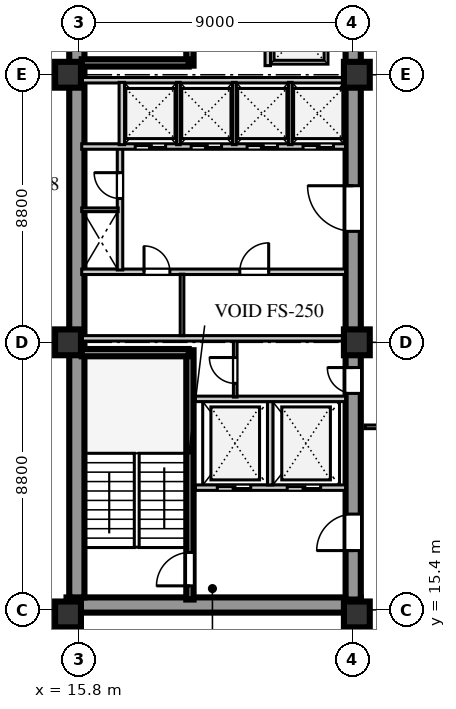
"""IFC4 building model, lengths in metres.
Left out: names, types, materials, properties, quantities, classifications, styles, units other than length and angle.
Written with IfcOpenShell. Run it as: python <this file> out.ifc"""

import sys

from ifc_helpers import new_model, si_unit, direction, frame, frame_2d, origin, origin_2d, place, context, subcontext, project, spatial, rectangle, extrude, element, fill, save


model = new_model("IFC4")
c1 = context("Model", 3, precision=1e-05, world=origin(), true_north=direction((0.0, 1.0)))
c2 = subcontext(c1, "Body", "Model", "MODEL_VIEW")
j1 = project(units=[si_unit("LENGTHUNIT", "METRE"), si_unit("PLANEANGLEUNIT", "RADIAN")], contexts=[c1])
p1 = place(None, origin())
s1 = spatial("IfcSite", under=j1, at=p1, CompositionType="ELEMENT")
p2 = place(p1, origin())
s2 = spatial("IfcBuilding", under=s1, at=p2, CompositionType="ELEMENT")
p3 = place(p2, frame((0.0, 0.0, 181.0)))
s3 = spatial("IfcBuildingStorey", under=s2, at=p3, CompositionType="ELEMENT", Elevation=181.0)
p4 = place(p3, frame((15.4, 15.56, 0.0), z_axis=(0.0, 0.0, 1.0), x_axis=(1.0, 0.0, 0.0)))
e1 = element("IfcWall", 1, at=p4, inside=s3, PredefinedType="SHEAR", context=c2, shape_type="SweptSolid", body=[
    extrude(rectangle(XDim=9.68, YDim=0.5, at=frame_2d((4.84, 0.0))), origin(), (0.0, 0.0, 1.0), 3.6),
])
p5 = place(p3, frame((15.74, 15.81, 0.0), z_axis=(0.0, 0.0, 1.0), x_axis=(0.0, 1.0, 0.0)))
e2 = element("IfcWall", 2, at=p5, inside=s3, PredefinedType="SHEAR", context=c2, shape_type="SweptSolid", body=[
    extrude(rectangle(XDim=25.63, YDim=0.5, at=frame_2d((12.815, 0.0))), origin(), (0.0, 0.0, 1.0), 3.6),
])
p6 = place(p3, frame((24.83, 15.74, 0.0), z_axis=(0.0, 0.0, 1.0), x_axis=(0.0, 1.0, 0.0)))
e3 = element("IfcWall", 3, at=p6, inside=s3, PredefinedType="SHEAR", context=c2, shape_type="SweptSolid", body=[
    extrude(rectangle(XDim=25.76, YDim=0.5, at=frame_2d((12.88, 0.0))), origin(), (0.0, 0.0, 1.0), 3.6),
])
p7 = place(p6, frame((1.61, 0.0, 0.0)))
e4 = element("IfcOpeningElement", 4, at=p7, cuts=e3, PredefinedType="OPENING", context=c2, shape_type="SweptSolid", body=[
    extrude(rectangle(XDim=1.2, YDim=2.1, at=frame_2d((0.6, 1.05))), frame((0.0, 0.26, 0.0), z_axis=(0.0, -1.0, 0.0), x_axis=(1.0, 0.0, 0.0)), (0.0, 0.0, 1.0), 0.52),
])
p8 = place(p6, frame((6.78, 0.0, 0.0)))
e5 = element("IfcOpeningElement", 5, at=p8, cuts=e3, PredefinedType="OPENING", context=c2, shape_type="SweptSolid", body=[
    extrude(rectangle(XDim=0.85, YDim=2.06, at=frame_2d((0.425, 1.03))), frame((0.0, 0.26, 0.0), z_axis=(0.0, -1.0, 0.0), x_axis=(1.0, 0.0, 0.0)), (0.0, 0.0, 1.0), 0.52),
])
p9 = place(p6, frame((12.11, 0.0, 0.0)))
e6 = element("IfcOpeningElement", 6, at=p9, cuts=e3, PredefinedType="OPENING", context=c2, shape_type="SweptSolid", body=[
    extrude(rectangle(XDim=1.5, YDim=2.12, at=frame_2d((0.75, 1.06))), frame((0.0, 0.26, 0.0), z_axis=(0.0, -1.0, 0.0), x_axis=(1.0, 0.0, 0.0)), (0.0, 0.0, 1.0), 0.52),
])
p10 = place(p6, frame((20.11, 0.0, 0.0)))
e7 = element("IfcOpeningElement", 7, at=p10, cuts=e3, PredefinedType="OPENING", context=c2, shape_type="SweptSolid", body=[
    extrude(rectangle(XDim=1.2, YDim=2.12, at=frame_2d((0.6, 1.06))), frame((0.0, 0.26, 0.0), z_axis=(0.0, -1.0, 0.0), x_axis=(1.0, 0.0, 0.0)), (0.0, 0.0, 1.0), 0.52),
])
p11 = place(p6, frame((24.01, 0.0, 0.0)))
e8 = element("IfcOpeningElement", 8, at=p11, cuts=e3, PredefinedType="OPENING", context=c2, shape_type="SweptSolid", body=[
    extrude(rectangle(XDim=0.95, YDim=2.1, at=frame_2d((0.475, 1.05))), frame((0.0, 0.26, 0.0), z_axis=(0.0, -1.0, 0.0), x_axis=(1.0, 0.0, 0.0)), (0.0, 0.0, 1.0), 0.52),
])
for number, where, z_axis, x_axis in (
    (9, (15.45, 15.25, 0.0), (0.0, 0.0, 1.0), (1.0, 0.0, 0.0)),
    (10, (15.45, 24.2, 0.0), (0.0, 0.0, 1.0), (1.0, 0.0, 0.0)),
    (11, (15.45, 33.0, 0.0), (0.0, 0.0, 1.0), (1.0, 0.0, 0.0)),
    (12, (24.95, 15.25, 0.0), (0.0, 0.0, 1.0), (1.0, 0.0, 0.0)),
    (13, (24.95, 24.2, 0.0), (0.0, 0.0, 1.0), (1.0, 0.0, 0.0)),
    (14, (24.95, 33.0, 0.0), (0.0, 0.0, 1.0), (1.0, 0.0, 0.0)),
):
    element("IfcColumn", number, at=place(p3, frame(where, z_axis=z_axis, x_axis=x_axis)), inside=s3, PredefinedType="COLUMN", context=c2, shape_type="SweptSolid", body=[
        extrude(rectangle(XDim=0.85, YDim=0.85, at=origin_2d()), origin(), (0.0, 0.0, 1.0), 3.6),
    ])
p12 = place(p3, frame((19.46, 15.74, 0.0), z_axis=(0.0, 0.0, 1.0), x_axis=(0.0, 1.0, 0.0)))
e15 = element("IfcWall", 15, at=p12, inside=s3, PredefinedType="SHEAR", context=c2, shape_type="SweptSolid", body=[
    extrude(rectangle(XDim=8.2, YDim=0.24, at=frame_2d((4.1, 0.0))), origin(), (0.0, 0.0, 1.0), 3.85),
])
p13 = place(p12, frame((0.45, 0.0, 0.0)))
e16 = element("IfcOpeningElement", 16, at=p13, cuts=e15, PredefinedType="OPENING", context=c2, shape_type="SweptSolid", body=[
    extrude(rectangle(XDim=1.1, YDim=2.1, at=frame_2d((0.55, 1.05))), frame((0.0, 0.13, 0.0), z_axis=(0.0, -1.0, 0.0), x_axis=(1.0, 0.0, 0.0)), (0.0, 0.0, 1.0), 0.26),
])
p14 = place(p3, frame((15.9, 23.86, 0.0), z_axis=(0.0, 0.0, 1.0), x_axis=(1.0, 0.0, 0.0)))
e17 = element("IfcWall", 17, at=p14, inside=s3, PredefinedType="SHEAR", context=c2, shape_type="SweptSolid", body=[
    extrude(rectangle(XDim=3.52, YDim=0.24, at=frame_2d((1.76, 0.0))), origin(), (0.0, 0.0, 1.0), 3.85),
])
p15 = place(p3, frame((19.64, 19.42, 0.0), z_axis=(0.0, 0.0, 1.0), x_axis=(1.0, 0.0, 0.0)))
e18 = element("IfcWall", 18, at=p15, inside=s3, PredefinedType="SOLIDWALL", context=c2, shape_type="SweptSolid", body=[
    extrude(rectangle(XDim=4.94, YDim=0.18, at=frame_2d((2.47, 0.0))), origin(), (0.0, 0.0, 1.0), 3.6),
])
p16 = place(p15, frame((0.72, 0.0, 0.0)))
e19 = element("IfcOpeningElement", 19, at=p16, cuts=e18, PredefinedType="OPENING", context=c2, shape_type="SweptSolid", body=[
    extrude(rectangle(XDim=1.1, YDim=2.1, at=frame_2d((0.55, 1.05))), frame((0.0, 0.1, 0.0), z_axis=(0.0, -1.0, 0.0), x_axis=(1.0, 0.0, 0.0)), (0.0, 0.0, 1.0), 0.2),
])
p17 = place(p15, frame((3.02, 0.0, 0.0)))
e20 = element("IfcOpeningElement", 20, at=p17, cuts=e18, PredefinedType="OPENING", context=c2, shape_type="SweptSolid", body=[
    extrude(rectangle(XDim=1.1, YDim=2.1, at=frame_2d((0.55, 1.05))), frame((0.0, 0.1, 0.0), z_axis=(0.0, -1.0, 0.0), x_axis=(1.0, 0.0, 0.0)), (0.0, 0.0, 1.0), 0.2),
])
p18 = place(p3, frame((22.1, 19.51, 0.0), z_axis=(0.0, 0.0, 1.0), x_axis=(0.0, 1.0, 0.0)))
e21 = element("IfcWall", 21, at=p18, inside=s3, PredefinedType="SOLIDWALL", context=c2, shape_type="SweptSolid", body=[
    extrude(rectangle(XDim=2.74, YDim=0.18, at=frame_2d((1.37, 0.0))), origin(), (0.0, 0.0, 1.0), 3.6),
])
p19 = place(p3, frame((19.64, 22.34, 0.0), z_axis=(0.0, 0.0, 1.0), x_axis=(1.0, 0.0, 0.0)))
e22 = element("IfcWall", 22, at=p19, inside=s3, PredefinedType="SOLIDWALL", context=c2, shape_type="SweptSolid", body=[
    extrude(rectangle(XDim=4.94, YDim=0.18, at=frame_2d((2.47, 0.0))), origin(), (0.0, 0.0, 1.0), 3.6),
])
p20 = place(p3, frame((20.95, 22.4, 0.0), z_axis=(0.0, 0.0, 1.0), x_axis=(0.0, 1.0, 0.0)))
e23 = element("IfcWall", 23, at=p20, inside=s3, PredefinedType="PARTITIONING", context=c2, shape_type="SweptSolid", body=[
    extrude(rectangle(XDim=1.88, YDim=0.12, at=frame_2d((0.94, 0.0))), origin(), (0.0, 0.0, 1.0), 3.6),
])
p21 = place(p20, frame((0.45, 0.0, 0.0)))
e24 = element("IfcOpeningElement", 24, at=p21, cuts=e23, PredefinedType="OPENING", context=c2, shape_type="SweptSolid", body=[
    extrude(rectangle(XDim=0.85, YDim=2.06, at=frame_2d((0.425, 1.03))), frame((0.0, 0.07, 0.0), z_axis=(0.0, -1.0, 0.0), x_axis=(1.0, 0.0, 0.0)), (0.0, 0.0, 1.0), 0.14),
])
p22 = place(p3, frame((15.9, 26.52, 0.0), z_axis=(0.0, 0.0, 1.0), x_axis=(1.0, 0.0, 0.0)))
e25 = element("IfcWall", 25, at=p22, inside=s3, PredefinedType="SOLIDWALL", context=c2, shape_type="SweptSolid", body=[
    extrude(rectangle(XDim=8.68, YDim=0.18, at=frame_2d((4.34, 0.0))), origin(), (0.0, 0.0, 1.0), 3.6),
])
p23 = place(p22, frame((2.05, 0.0, 0.0)))
e26 = element("IfcOpeningElement", 26, at=p23, cuts=e25, PredefinedType="OPENING", context=c2, shape_type="SweptSolid", body=[
    extrude(rectangle(XDim=0.85, YDim=2.06, at=frame_2d((0.425, 1.03))), frame((0.0, 0.1, 0.0), z_axis=(0.0, -1.0, 0.0), x_axis=(1.0, 0.0, 0.0)), (0.0, 0.0, 1.0), 0.2),
])
p24 = place(p22, frame((5.2, 0.0, 0.0)))
e27 = element("IfcOpeningElement", 27, at=p24, cuts=e25, PredefinedType="OPENING", context=c2, shape_type="SweptSolid", body=[
    extrude(rectangle(XDim=0.95, YDim=2.1, at=frame_2d((0.475, 1.05))), frame((0.0, 0.1, 0.0), z_axis=(0.0, -1.0, 0.0), x_axis=(1.0, 0.0, 0.0)), (0.0, 0.0, 1.0), 0.2),
])
p25 = place(p3, frame((15.9, 24.33, 0.0), z_axis=(0.0, 0.0, 1.0), x_axis=(1.0, 0.0, 0.0)))
e28 = element("IfcWall", 28, at=p25, inside=s3, PredefinedType="SOLIDWALL", context=c2, shape_type="SweptSolid", body=[
    extrude(rectangle(XDim=8.68, YDim=0.18, at=frame_2d((4.34, 0.0))), origin(), (0.0, 0.0, 1.0), 2.95),
])
p26 = place(p3, frame((19.2, 24.42, 0.0), z_axis=(0.0, 0.0, 1.0), x_axis=(0.0, 1.0, 0.0)))
e29 = element("IfcWall", 29, at=p26, inside=s3, PredefinedType="PARTITIONING", context=c2, shape_type="SweptSolid", body=[
    extrude(rectangle(XDim=2.02, YDim=0.12, at=frame_2d((1.01, 0.0))), origin(), (0.0, 0.0, 1.0), 3.6),
])
p27 = place(p3, frame((17.16, 26.58, 0.0), z_axis=(0.0, 0.0, 1.0), x_axis=(0.0, 1.0, 0.0)))
e30 = element("IfcWall", 30, at=p27, inside=s3, PredefinedType="SOLIDWALL", context=c2, shape_type="SweptSolid", body=[
    extrude(rectangle(XDim=4.02, YDim=0.18, at=frame_2d((2.01, 0.0))), origin(), (0.0, 0.0, 1.0), 3.6),
])
p28 = place(p27, frame((2.35, 0.0, 0.0)))
e31 = element("IfcOpeningElement", 31, at=p28, cuts=e30, PredefinedType="OPENING", context=c2, shape_type="SweptSolid", body=[
    extrude(rectangle(XDim=0.85, YDim=2.06, at=frame_2d((0.425, 1.03))), frame((0.0, 0.1, 0.0), z_axis=(0.0, -1.0, 0.0), x_axis=(1.0, 0.0, 0.0)), (0.0, 0.0, 1.0), 0.2),
])
p29 = place(p3, frame((15.9, 28.56, 0.0), z_axis=(0.0, 0.0, 1.0), x_axis=(1.0, 0.0, 0.0)))
e32 = element("IfcWall", 32, at=p29, inside=s3, PredefinedType="PARTITIONING", context=c2, shape_type="SweptSolid", body=[
    extrude(rectangle(XDim=1.2, YDim=0.12, at=frame_2d((0.6, 0.0))), origin(), (0.0, 0.0, 1.0), 3.6),
])
p30 = place(p3, frame((15.9, 30.64, 0.0), z_axis=(0.0, 0.0, 1.0), x_axis=(1.0, 0.0, 0.0)))
e33 = element("IfcWall", 33, at=p30, inside=s3, PredefinedType="SOLIDWALL", context=c2, shape_type="SweptSolid", body=[
    extrude(rectangle(XDim=8.68, YDim=0.18, at=frame_2d((4.34, 0.0))), origin(), (0.0, 0.0, 1.0), 3.6),
])
p31 = place(p30, frame((1.76, 0.0, 0.0)))
e34 = element("IfcOpeningElement", 34, at=p31, cuts=e33, PredefinedType="OPENING", context=c2, shape_type="SweptSolid", body=[
    extrude(rectangle(XDim=1.0, YDim=2.1, at=frame_2d((0.5, 1.05))), frame((0.0, 0.1, 0.0), z_axis=(0.0, -1.0, 0.0), x_axis=(1.0, 0.0, 0.0)), (0.0, 0.0, 1.0), 0.2),
])
p32 = place(p30, frame((3.6, 0.0, 0.0)))
e35 = element("IfcOpeningElement", 35, at=p32, cuts=e33, PredefinedType="OPENING", context=c2, shape_type="SweptSolid", body=[
    extrude(rectangle(XDim=1.0, YDim=2.1, at=frame_2d((0.5, 1.05))), frame((0.0, 0.1, 0.0), z_axis=(0.0, -1.0, 0.0), x_axis=(1.0, 0.0, 0.0)), (0.0, 0.0, 1.0), 0.2),
])
p33 = place(p30, frame((5.44, 0.0, 0.0)))
e36 = element("IfcOpeningElement", 36, at=p33, cuts=e33, PredefinedType="OPENING", context=c2, shape_type="SweptSolid", body=[
    extrude(rectangle(XDim=1.0, YDim=2.1, at=frame_2d((0.5, 1.05))), frame((0.0, 0.1, 0.0), z_axis=(0.0, -1.0, 0.0), x_axis=(1.0, 0.0, 0.0)), (0.0, 0.0, 1.0), 0.2),
])
p34 = place(p30, frame((7.28, 0.0, 0.0)))
e37 = element("IfcOpeningElement", 37, at=p34, cuts=e33, PredefinedType="OPENING", context=c2, shape_type="SweptSolid", body=[
    extrude(rectangle(XDim=1.0, YDim=2.1, at=frame_2d((0.5, 1.05))), frame((0.0, 0.1, 0.0), z_axis=(0.0, -1.0, 0.0), x_axis=(1.0, 0.0, 0.0)), (0.0, 0.0, 1.0), 0.2),
])
p35 = place(p3, frame((15.9, 32.82, 0.0), z_axis=(0.0, 0.0, 1.0), x_axis=(1.0, 0.0, 0.0)))
e38 = element("IfcWall", 38, at=p35, inside=s3, PredefinedType="SOLIDWALL", context=c2, shape_type="SweptSolid", body=[
    extrude(rectangle(XDim=8.68, YDim=0.18, at=frame_2d((4.34, 0.0))), origin(), (0.0, 0.0, 1.0), 2.95),
])
p36 = place(p3, frame((17.22, 30.7, 0.0), z_axis=(0.0, 0.0, 1.0), x_axis=(0.0, 1.0, 0.0)))
e39 = element("IfcWall", 39, at=p36, inside=s3, PredefinedType="SOLIDWALL", context=c2, shape_type="SweptSolid", body=[
    extrude(rectangle(XDim=2.05, YDim=0.18, at=frame_2d((1.025, 0.0))), origin(), (0.0, 0.0, 1.0), 3.6),
])
for number, where, z_axis, x_axis in (
    (40, (19.08, 30.7, 0.0), (0.0, 0.0, 1.0), (0.0, 1.0, 0.0)),
    (41, (20.92, 30.7, 0.0), (0.0, 0.0, 1.0), (0.0, 1.0, 0.0)),
    (42, (22.76, 30.7, 0.0), (0.0, 0.0, 1.0), (0.0, 1.0, 0.0)),
):
    element("IfcWall", number, at=place(p3, frame(where, z_axis=z_axis, x_axis=x_axis)), inside=s3, PredefinedType="PARTITIONING", context=c2, shape_type="SweptSolid", body=[
        extrude(rectangle(XDim=2.05, YDim=0.12, at=frame_2d((1.025, 0.0))), origin(), (0.0, 0.0, 1.0), 3.6),
    ])
p37 = place(p3, frame((19.46, 33.3, 0.0), z_axis=(0.0, 0.0, 1.0), x_axis=(0.0, 1.0, 0.0)))
e43 = element("IfcWall", 43, at=p37, inside=s3, PredefinedType="SHEAR", context=c2, shape_type="SweptSolid", body=[
    extrude(rectangle(XDim=8.18, YDim=0.24, at=frame_2d((4.09, 0.0))), origin(), (0.0, 0.0, 1.0), 3.85),
])
p38 = place(p37, frame((0.65, 0.0, 0.0)))
e44 = element("IfcOpeningElement", 44, at=p38, cuts=e43, PredefinedType="OPENING", context=c2, shape_type="SweptSolid", body=[
    extrude(rectangle(XDim=1.1, YDim=2.1, at=frame_2d((0.55, 1.05))), frame((0.0, 0.13, 0.0), z_axis=(0.0, -1.0, 0.0), x_axis=(1.0, 0.0, 0.0)), (0.0, 0.0, 1.0), 0.26),
])
p39 = place(p3, frame((15.9, 33.39, 0.0), z_axis=(0.0, 0.0, 1.0), x_axis=(1.0, 0.0, 0.0)))
e45 = element("IfcWall", 45, at=p39, inside=s3, PredefinedType="SHEAR", context=c2, shape_type="SweptSolid", body=[
    extrude(rectangle(XDim=3.52, YDim=0.24, at=frame_2d((1.76, 0.0))), origin(), (0.0, 0.0, 1.0), 3.85),
])
p40 = place(p3, frame((22.02, 33.3, 0.0), z_axis=(0.0, 0.0, 1.0), x_axis=(0.0, 1.0, 0.0)))
e46 = element("IfcWall", 46, at=p40, inside=s3, PredefinedType="SOLIDWALL", context=c2, shape_type="SweptSolid", body=[
    extrude(rectangle(XDim=2.01, YDim=0.18, at=frame_2d((1.005, 0.0))), origin(), (0.0, 0.0, 1.0), 3.6),
])
p41 = place(p3, frame((25.22, 21.42, 0.0), z_axis=(0.0, 0.0, 1.0), x_axis=(1.0, 0.0, 0.0)))
e47 = element("IfcWall", 47, at=p41, inside=s3, PredefinedType="PARTITIONING", context=c2, shape_type="SweptSolid", body=[
    extrude(rectangle(XDim=15.6, YDim=0.12, at=frame_2d((7.8, 0.0))), origin(), (0.0, 0.0, 1.0), 3.25),
])
p42 = place(p41, frame((0.73, 0.0, 0.0)))
e48 = element("IfcOpeningElement", 48, at=p42, cuts=e47, PredefinedType="OPENING", context=c2, shape_type="SweptSolid", body=[
    extrude(rectangle(XDim=0.95, YDim=2.1, at=frame_2d((0.475, 1.05))), frame((0.0, 0.07, 0.0), z_axis=(0.0, -1.0, 0.0), x_axis=(1.0, 0.0, 0.0)), (0.0, 0.0, 1.0), 0.14),
])
p43 = place(p41, frame((4.83, 0.0, 0.0)))
e49 = element("IfcOpeningElement", 49, at=p43, cuts=e47, PredefinedType="OPENING", context=c2, shape_type="SweptSolid", body=[
    extrude(rectangle(XDim=0.95, YDim=2.1, at=frame_2d((0.475, 1.05))), frame((0.0, 0.07, 0.0), z_axis=(0.0, -1.0, 0.0), x_axis=(1.0, 0.0, 0.0)), (0.0, 0.0, 1.0), 0.14),
])
p44 = place(p41, frame((10.23, 0.0, 0.0)))
e50 = element("IfcOpeningElement", 50, at=p44, cuts=e47, PredefinedType="OPENING", context=c2, shape_type="SweptSolid", body=[
    extrude(rectangle(XDim=0.95, YDim=2.1, at=frame_2d((0.475, 1.05))), frame((0.0, 0.07, 0.0), z_axis=(0.0, -1.0, 0.0), x_axis=(1.0, 0.0, 0.0)), (0.0, 0.0, 1.0), 0.14),
])
p45 = place(p13, origin())
e51 = element("IfcDoor", 51, at=p45, inside=s3, OperationType="SINGLE_SWING_LEFT", PredefinedType="DOOR", context=c2, shape_type="SweptSolid", body=[
    extrude(rectangle(XDim=1.1, YDim=2.1, at=frame_2d((0.55, 1.05))), frame((0.0, 0.025, 0.0), z_axis=(0.0, -1.0, 0.0), x_axis=(1.0, 0.0, 0.0)), (0.0, 0.0, 1.0), 0.05),
])
fill(e16, e51)
p46 = place(p16, origin())
e52 = element("IfcDoor", 52, at=p46, inside=s3, OperationType="DOUBLE_DOOR_SLIDING", PredefinedType="DOOR", context=c2, shape_type="SweptSolid", body=[
    extrude(rectangle(XDim=1.1, YDim=2.1, at=frame_2d((0.55, 1.05))), frame((0.0, 0.025, 0.0), z_axis=(0.0, -1.0, 0.0), x_axis=(1.0, 0.0, 0.0)), (0.0, 0.0, 1.0), 0.05),
])
fill(e19, e52)
p47 = place(p17, origin())
e53 = element("IfcDoor", 53, at=p47, inside=s3, OperationType="DOUBLE_DOOR_SLIDING", PredefinedType="DOOR", context=c2, shape_type="SweptSolid", body=[
    extrude(rectangle(XDim=1.1, YDim=2.1, at=frame_2d((0.55, 1.05))), frame((0.0, 0.025, 0.0), z_axis=(0.0, -1.0, 0.0), x_axis=(1.0, 0.0, 0.0)), (0.0, 0.0, 1.0), 0.05),
])
fill(e20, e53)
p48 = place(p7, frame((1.2, 0.0, 0.0), z_axis=(0.0, 0.0, 1.0), x_axis=(-1.0, 0.0, 0.0)))
e54 = element("IfcDoor", 54, at=p48, inside=s3, OperationType="SINGLE_SWING_RIGHT", PredefinedType="DOOR", context=c2, shape_type="SweptSolid", body=[
    extrude(rectangle(XDim=1.2, YDim=2.1, at=frame_2d((0.6, 1.05))), frame((0.0, 0.025, 0.0), z_axis=(0.0, -1.0, 0.0), x_axis=(1.0, 0.0, 0.0)), (0.0, 0.0, 1.0), 0.05),
])
fill(e4, e54)
p49 = place(p21, origin())
e55 = element("IfcDoor", 55, at=p49, inside=s3, OperationType="SINGLE_SWING_RIGHT", PredefinedType="DOOR", context=c2, shape_type="SweptSolid", body=[
    extrude(rectangle(XDim=0.85, YDim=2.06, at=frame_2d((0.425, 1.03))), frame((0.0, 0.025, 0.0), z_axis=(0.0, -1.0, 0.0), x_axis=(1.0, 0.0, 0.0)), (0.0, 0.0, 1.0), 0.05),
])
fill(e24, e55)
p50 = place(p8, frame((0.85, 0.0, 0.0), z_axis=(0.0, 0.0, 1.0), x_axis=(-1.0, 0.0, 0.0)))
e56 = element("IfcDoor", 56, at=p50, inside=s3, OperationType="SINGLE_SWING_LEFT", PredefinedType="DOOR", context=c2, shape_type="SweptSolid", body=[
    extrude(rectangle(XDim=0.85, YDim=2.06, at=frame_2d((0.425, 1.03))), frame((0.0, 0.025, 0.0), z_axis=(0.0, -1.0, 0.0), x_axis=(1.0, 0.0, 0.0)), (0.0, 0.0, 1.0), 0.05),
])
fill(e5, e56)
p51 = place(p23, origin())
e57 = element("IfcDoor", 57, at=p51, inside=s3, OperationType="SINGLE_SWING_LEFT", PredefinedType="DOOR", context=c2, shape_type="SweptSolid", body=[
    extrude(rectangle(XDim=0.85, YDim=2.06, at=frame_2d((0.425, 1.03))), frame((0.0, 0.025, 0.0), z_axis=(0.0, -1.0, 0.0), x_axis=(1.0, 0.0, 0.0)), (0.0, 0.0, 1.0), 0.05),
])
fill(e26, e57)
p52 = place(p24, origin())
e58 = element("IfcDoor", 58, at=p52, inside=s3, OperationType="SINGLE_SWING_RIGHT", PredefinedType="DOOR", context=c2, shape_type="SweptSolid", body=[
    extrude(rectangle(XDim=0.95, YDim=2.1, at=frame_2d((0.475, 1.05))), frame((0.0, 0.025, 0.0), z_axis=(0.0, -1.0, 0.0), x_axis=(1.0, 0.0, 0.0)), (0.0, 0.0, 1.0), 0.05),
])
fill(e27, e58)
p53 = place(p28, origin())
e59 = element("IfcDoor", 59, at=p53, inside=s3, OperationType="SINGLE_SWING_RIGHT", PredefinedType="DOOR", context=c2, shape_type="SweptSolid", body=[
    extrude(rectangle(XDim=0.85, YDim=2.06, at=frame_2d((0.425, 1.03))), frame((0.0, 0.025, 0.0), z_axis=(0.0, -1.0, 0.0), x_axis=(1.0, 0.0, 0.0)), (0.0, 0.0, 1.0), 0.05),
])
fill(e31, e59)
p54 = place(p9, frame((1.5, 0.0, 0.0), z_axis=(0.0, 0.0, 1.0), x_axis=(-1.0, 0.0, 0.0)))
e60 = element("IfcDoor", 60, at=p54, inside=s3, OperationType="SINGLE_SWING_LEFT", PredefinedType="DOOR", context=c2, shape_type="SweptSolid", body=[
    extrude(rectangle(XDim=1.5, YDim=2.12, at=frame_2d((0.75, 1.06))), frame((0.0, 0.025, 0.0), z_axis=(0.0, -1.0, 0.0), x_axis=(1.0, 0.0, 0.0)), (0.0, 0.0, 1.0), 0.05),
])
fill(e6, e60)
p55 = place(p31, frame((1.0, 0.0, 0.0), z_axis=(0.0, 0.0, 1.0), x_axis=(-1.0, 0.0, 0.0)))
e61 = element("IfcDoor", 61, at=p55, inside=s3, OperationType="DOUBLE_DOOR_SLIDING", PredefinedType="DOOR", context=c2, shape_type="SweptSolid", body=[
    extrude(rectangle(XDim=1.0, YDim=2.1, at=frame_2d((0.5, 1.05))), frame((0.0, 0.025, 0.0), z_axis=(0.0, -1.0, 0.0), x_axis=(1.0, 0.0, 0.0)), (0.0, 0.0, 1.0), 0.05),
])
fill(e34, e61)
p56 = place(p32, frame((1.0, 0.0, 0.0), z_axis=(0.0, 0.0, 1.0), x_axis=(-1.0, 0.0, 0.0)))
e62 = element("IfcDoor", 62, at=p56, inside=s3, OperationType="DOUBLE_DOOR_SLIDING", PredefinedType="DOOR", context=c2, shape_type="SweptSolid", body=[
    extrude(rectangle(XDim=1.0, YDim=2.1, at=frame_2d((0.5, 1.05))), frame((0.0, 0.025, 0.0), z_axis=(0.0, -1.0, 0.0), x_axis=(1.0, 0.0, 0.0)), (0.0, 0.0, 1.0), 0.05),
])
fill(e35, e62)
p57 = place(p33, frame((1.0, 0.0, 0.0), z_axis=(0.0, 0.0, 1.0), x_axis=(-1.0, 0.0, 0.0)))
e63 = element("IfcDoor", 63, at=p57, inside=s3, OperationType="DOUBLE_DOOR_SLIDING", PredefinedType="DOOR", context=c2, shape_type="SweptSolid", body=[
    extrude(rectangle(XDim=1.0, YDim=2.1, at=frame_2d((0.5, 1.05))), frame((0.0, 0.025, 0.0), z_axis=(0.0, -1.0, 0.0), x_axis=(1.0, 0.0, 0.0)), (0.0, 0.0, 1.0), 0.05),
])
fill(e36, e63)
p58 = place(p34, frame((1.0, 0.0, 0.0), z_axis=(0.0, 0.0, 1.0), x_axis=(-1.0, 0.0, 0.0)))
e64 = element("IfcDoor", 64, at=p58, inside=s3, OperationType="DOUBLE_DOOR_SLIDING", PredefinedType="DOOR", context=c2, shape_type="SweptSolid", body=[
    extrude(rectangle(XDim=1.0, YDim=2.1, at=frame_2d((0.5, 1.05))), frame((0.0, 0.025, 0.0), z_axis=(0.0, -1.0, 0.0), x_axis=(1.0, 0.0, 0.0)), (0.0, 0.0, 1.0), 0.05),
])
fill(e37, e64)
save(model, sys.argv[1])
